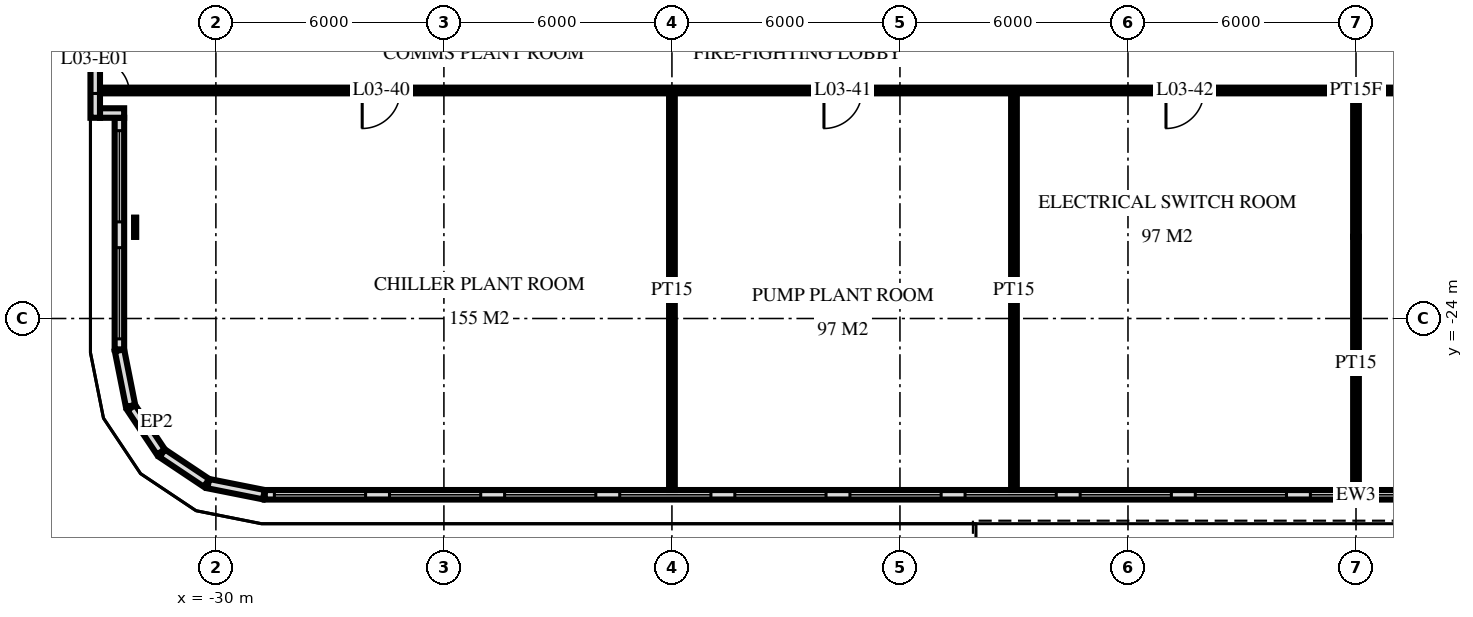
"""IFC4 building model, lengths in metres.
Left out: names, types, materials, properties, quantities, classifications, styles, units other than length and angle.
Written with IfcOpenShell. Run it as: python <this file> out.ifc"""

import sys

from ifc_helpers import new_model, si_unit, direction, frame, frame_2d, origin, place, context, subcontext, project, spatial, rectangle, extrude, element, fill, save


model = new_model("IFC4")
c1 = context("Model", 3, precision=1e-05, world=origin(), true_north=direction((0.0, 1.0)))
c2 = subcontext(c1, "Body", "Model", "MODEL_VIEW")
j1 = project(units=[si_unit("LENGTHUNIT", "METRE"), si_unit("PLANEANGLEUNIT", "RADIAN")], contexts=[c1])
p1 = place(None, origin())
s1 = spatial("IfcSite", under=j1, at=p1, CompositionType="ELEMENT")
p2 = place(p1, origin())
s2 = spatial("IfcBuilding", under=s1, at=p2, CompositionType="ELEMENT")
p3 = place(p2, frame((0.0, 0.0, 18.0)))
s3 = spatial("IfcBuildingStorey", under=s2, at=p3, CompositionType="ELEMENT", Elevation=18.0)
p4 = place(p3, frame((-33.175, -15.889, 0.0), z_axis=(0.0, 0.0, 1.0), x_axis=(0.0, -1.0, 0.0)))
e1 = element("IfcWall", 1, at=p4, inside=s3, PredefinedType="SOLIDWALL", context=c2, shape_type="SweptSolid", body=[
    extrude(rectangle(XDim=2.829, YDim=0.25, at=frame_2d((1.414, 0.0))), origin(), (0.0, 0.0, 1.0), 5.72),
])
p5 = place(p4, frame((0.389, 0.0, 0.0)))
e2 = element("IfcOpeningElement", 2, at=p5, cuts=e1, PredefinedType="OPENING", context=c2, shape_type="SweptSolid", body=[
    extrude(rectangle(XDim=1.8, YDim=2.4, at=frame_2d((0.9, 1.2))), frame((0.0, 0.135, 0.0), z_axis=(0.0, -1.0, 0.0), x_axis=(1.0, 0.0, 0.0)), (0.0, 0.0, 1.0), 0.27),
])
p6 = place(p3, frame((-33.05, -18.593, 0.0), z_axis=(0.0, 0.0, 1.0), x_axis=(1.0, 0.0, 0.0)))
e3 = element("IfcWall", 3, at=p6, inside=s3, PredefinedType="SOLIDWALL", context=c2, shape_type="SweptSolid", body=[
    extrude(rectangle(XDim=0.636, YDim=0.25, at=frame_2d((0.318, 0.0))), origin(), (0.0, 0.0, 1.0), 5.72),
])
p7 = place(p3, frame((-32.539, -18.718, 0.0), z_axis=(0.0, 0.0, 1.0), x_axis=(0.0, -1.0, 0.0)))
e4 = element("IfcWall", 4, at=p7, inside=s3, PredefinedType="SOLIDWALL", context=c2, shape_type="SweptSolid", body=[
    extrude(rectangle(XDim=6.095, YDim=0.25, at=frame_2d((3.047, 0.0))), origin(), (0.0, 0.0, 1.0), 5.72),
])
p8 = place(p7, frame((0.339, 0.0, 1.005)))
e5 = element("IfcOpeningElement", 5, at=p8, cuts=e4, PredefinedType="OPENING", context=c2, shape_type="SweptSolid", body=[
    extrude(rectangle(XDim=2.4, YDim=3.6, at=frame_2d((1.2, 1.8))), frame((0.0, 0.135, 0.0), z_axis=(0.0, -1.0, 0.0), x_axis=(1.0, 0.0, 0.0)), (0.0, 0.0, 1.0), 0.27),
])
p9 = place(p7, frame((3.418, 0.0, 1.005)))
e6 = element("IfcOpeningElement", 6, at=p9, cuts=e4, PredefinedType="OPENING", context=c2, shape_type="SweptSolid", body=[
    extrude(rectangle(XDim=2.4, YDim=3.6, at=frame_2d((1.2, 1.8))), frame((0.0, 0.135, 0.0), z_axis=(0.0, -1.0, 0.0), x_axis=(1.0, 0.0, 0.0)), (0.0, 0.0, 1.0), 0.27),
])
p10 = place(p3, frame((-32.537, -24.837, 0.0), z_axis=(0.0, 0.0, 1.0), x_axis=(0.195014837095, -0.980800292268, 0.0)))
e7 = element("IfcWall", 7, at=p10, inside=s3, PredefinedType="SOLIDWALL", context=c2, shape_type="SweptSolid", body=[
    extrude(rectangle(XDim=1.492, YDim=0.25, at=frame_2d((0.746, 0.0))), origin(), (0.0, 0.0, 1.0), 4.52),
])
for number, where, z_axis, x_axis in (
    (8, (-32.227, -26.346, 0.0), (0.0, 0.0, 1.0), (0.556, -0.831, 0.0)),
    (9, (-31.413, -27.547, 0.0), (0.0, 0.0, 1.0), (0.831, -0.556, 0.0)),
):
    element("IfcWall", number, at=place(p3, frame(where, z_axis=z_axis, x_axis=x_axis)), inside=s3, PredefinedType="SOLIDWALL", context=c2, shape_type="SweptSolid", body=[
        extrude(rectangle(XDim=1.403, YDim=0.25, at=frame_2d((0.702, 0.0))), origin(), (0.0, 0.0, 1.0), 5.72),
    ])
p11 = place(p3, frame((-30.201, -28.345, 0.0), z_axis=(0.0, 0.0, 1.0), x_axis=(0.980768988185, -0.19517221066, 0.0)))
e10 = element("IfcWall", 10, at=p11, inside=s3, PredefinedType="SOLIDWALL", context=c2, shape_type="SweptSolid", body=[
    extrude(rectangle(XDim=1.492, YDim=0.25, at=frame_2d((0.746, 0.0))), origin(), (0.0, 0.0, 1.0), 4.72),
])
p12 = place(p3, frame((-28.713, -28.639, 0.0), z_axis=(0.0, 0.0, 1.0), x_axis=(1.0, 0.0, 0.0)))
e11 = element("IfcWall", 11, at=p12, inside=s3, PredefinedType="SOLIDWALL", context=c2, shape_type="SweptSolid", body=[
    extrude(rectangle(XDim=57.426, YDim=0.25, at=frame_2d((28.713, 0.0))), origin(), (0.0, 0.0, 1.0), 5.72),
])
p13 = place(p12, frame((0.252, 0.0, 0.858)))
e12 = element("IfcOpeningElement", 12, at=p13, cuts=e11, PredefinedType="OPENING", context=c2, shape_type="SweptSolid", body=[
    extrude(rectangle(XDim=2.4, YDim=3.6, at=frame_2d((1.2, 1.8))), frame((0.0, 0.135, 0.0), z_axis=(0.0, -1.0, 0.0), x_axis=(1.0, 0.0, 0.0)), (0.0, 0.0, 1.0), 0.27),
])
p14 = place(p12, frame((3.281, 0.0, 0.858)))
e13 = element("IfcOpeningElement", 13, at=p14, cuts=e11, PredefinedType="OPENING", context=c2, shape_type="SweptSolid", body=[
    extrude(rectangle(XDim=2.4, YDim=3.6, at=frame_2d((1.2, 1.8))), frame((0.0, 0.135, 0.0), z_axis=(0.0, -1.0, 0.0), x_axis=(1.0, 0.0, 0.0)), (0.0, 0.0, 1.0), 0.27),
])
p15 = place(p12, frame((6.31, 0.0, 0.858)))
e14 = element("IfcOpeningElement", 14, at=p15, cuts=e11, PredefinedType="OPENING", context=c2, shape_type="SweptSolid", body=[
    extrude(rectangle(XDim=2.4, YDim=3.6, at=frame_2d((1.2, 1.8))), frame((0.0, 0.135, 0.0), z_axis=(0.0, -1.0, 0.0), x_axis=(1.0, 0.0, 0.0)), (0.0, 0.0, 1.0), 0.27),
])
p16 = place(p12, frame((9.339, 0.0, 0.858)))
e15 = element("IfcOpeningElement", 15, at=p16, cuts=e11, PredefinedType="OPENING", context=c2, shape_type="SweptSolid", body=[
    extrude(rectangle(XDim=2.4, YDim=3.6, at=frame_2d((1.2, 1.8))), frame((0.0, 0.135, 0.0), z_axis=(0.0, -1.0, 0.0), x_axis=(1.0, 0.0, 0.0)), (0.0, 0.0, 1.0), 0.27),
])
p17 = place(p12, frame((12.368, 0.0, 0.858)))
e16 = element("IfcOpeningElement", 16, at=p17, cuts=e11, PredefinedType="OPENING", context=c2, shape_type="SweptSolid", body=[
    extrude(rectangle(XDim=2.4, YDim=3.6, at=frame_2d((1.2, 1.8))), frame((0.0, 0.135, 0.0), z_axis=(0.0, -1.0, 0.0), x_axis=(1.0, 0.0, 0.0)), (0.0, 0.0, 1.0), 0.27),
])
p18 = place(p12, frame((15.397, 0.0, 0.858)))
e17 = element("IfcOpeningElement", 17, at=p18, cuts=e11, PredefinedType="OPENING", context=c2, shape_type="SweptSolid", body=[
    extrude(rectangle(XDim=2.4, YDim=3.6, at=frame_2d((1.2, 1.8))), frame((0.0, 0.135, 0.0), z_axis=(0.0, -1.0, 0.0), x_axis=(1.0, 0.0, 0.0)), (0.0, 0.0, 1.0), 0.27),
])
p19 = place(p12, frame((18.426, 0.0, 0.858)))
e18 = element("IfcOpeningElement", 18, at=p19, cuts=e11, PredefinedType="OPENING", context=c2, shape_type="SweptSolid", body=[
    extrude(rectangle(XDim=2.4, YDim=3.6, at=frame_2d((1.2, 1.8))), frame((0.0, 0.135, 0.0), z_axis=(0.0, -1.0, 0.0), x_axis=(1.0, 0.0, 0.0)), (0.0, 0.0, 1.0), 0.27),
])
p20 = place(p12, frame((21.455, 0.0, 0.858)))
e19 = element("IfcOpeningElement", 19, at=p20, cuts=e11, PredefinedType="OPENING", context=c2, shape_type="SweptSolid", body=[
    extrude(rectangle(XDim=2.4, YDim=3.6, at=frame_2d((1.2, 1.8))), frame((0.0, 0.135, 0.0), z_axis=(0.0, -1.0, 0.0), x_axis=(1.0, 0.0, 0.0)), (0.0, 0.0, 1.0), 0.27),
])
p21 = place(p12, frame((24.484, 0.0, 0.858)))
e20 = element("IfcOpeningElement", 20, at=p21, cuts=e11, PredefinedType="OPENING", context=c2, shape_type="SweptSolid", body=[
    extrude(rectangle(XDim=2.4, YDim=3.6, at=frame_2d((1.2, 1.8))), frame((0.0, 0.135, 0.0), z_axis=(0.0, -1.0, 0.0), x_axis=(1.0, 0.0, 0.0)), (0.0, 0.0, 1.0), 0.27),
])
p22 = place(p12, frame((27.513, 0.0, 0.858)))
e21 = element("IfcOpeningElement", 21, at=p22, cuts=e11, PredefinedType="OPENING", context=c2, shape_type="SweptSolid", body=[
    extrude(rectangle(XDim=2.4, YDim=3.6, at=frame_2d((1.2, 1.8))), frame((0.0, 0.135, 0.0), z_axis=(0.0, -1.0, 0.0), x_axis=(1.0, 0.0, 0.0)), (0.0, 0.0, 1.0), 0.27),
])
p23 = place(p12, frame((30.542, 0.0, 0.858)))
e22 = element("IfcOpeningElement", 22, at=p23, cuts=e11, PredefinedType="OPENING", context=c2, shape_type="SweptSolid", body=[
    extrude(rectangle(XDim=2.4, YDim=3.6, at=frame_2d((1.2, 1.8))), frame((0.0, 0.135, 0.0), z_axis=(0.0, -1.0, 0.0), x_axis=(1.0, 0.0, 0.0)), (0.0, 0.0, 1.0), 0.27),
])
p24 = place(p12, frame((33.571, 0.0, 0.858)))
e23 = element("IfcOpeningElement", 23, at=p24, cuts=e11, PredefinedType="OPENING", context=c2, shape_type="SweptSolid", body=[
    extrude(rectangle(XDim=2.4, YDim=3.6, at=frame_2d((1.2, 1.8))), frame((0.0, 0.135, 0.0), z_axis=(0.0, -1.0, 0.0), x_axis=(1.0, 0.0, 0.0)), (0.0, 0.0, 1.0), 0.27),
])
p25 = place(p12, frame((36.6, 0.0, 0.858)))
e24 = element("IfcOpeningElement", 24, at=p25, cuts=e11, PredefinedType="OPENING", context=c2, shape_type="SweptSolid", body=[
    extrude(rectangle(XDim=2.4, YDim=3.6, at=frame_2d((1.2, 1.8))), frame((0.0, 0.135, 0.0), z_axis=(0.0, -1.0, 0.0), x_axis=(1.0, 0.0, 0.0)), (0.0, 0.0, 1.0), 0.27),
])
p26 = place(p12, frame((39.629, 0.0, 0.858)))
e25 = element("IfcOpeningElement", 25, at=p26, cuts=e11, PredefinedType="OPENING", context=c2, shape_type="SweptSolid", body=[
    extrude(rectangle(XDim=2.4, YDim=3.6, at=frame_2d((1.2, 1.8))), frame((0.0, 0.135, 0.0), z_axis=(0.0, -1.0, 0.0), x_axis=(1.0, 0.0, 0.0)), (0.0, 0.0, 1.0), 0.27),
])
p27 = place(p12, frame((42.658, 0.0, 0.858)))
e26 = element("IfcOpeningElement", 26, at=p27, cuts=e11, PredefinedType="OPENING", context=c2, shape_type="SweptSolid", body=[
    extrude(rectangle(XDim=2.4, YDim=3.6, at=frame_2d((1.2, 1.8))), frame((0.0, 0.135, 0.0), z_axis=(0.0, -1.0, 0.0), x_axis=(1.0, 0.0, 0.0)), (0.0, 0.0, 1.0), 0.27),
])
p28 = place(p12, frame((45.687, 0.0, 0.858)))
e27 = element("IfcOpeningElement", 27, at=p28, cuts=e11, PredefinedType="OPENING", context=c2, shape_type="SweptSolid", body=[
    extrude(rectangle(XDim=2.4, YDim=3.6, at=frame_2d((1.2, 1.8))), frame((0.0, 0.135, 0.0), z_axis=(0.0, -1.0, 0.0), x_axis=(1.0, 0.0, 0.0)), (0.0, 0.0, 1.0), 0.27),
])
p29 = place(p12, frame((48.716, 0.0, 0.858)))
e28 = element("IfcOpeningElement", 28, at=p29, cuts=e11, PredefinedType="OPENING", context=c2, shape_type="SweptSolid", body=[
    extrude(rectangle(XDim=2.4, YDim=3.6, at=frame_2d((1.2, 1.8))), frame((0.0, 0.135, 0.0), z_axis=(0.0, -1.0, 0.0), x_axis=(1.0, 0.0, 0.0)), (0.0, 0.0, 1.0), 0.27),
])
p30 = place(p12, frame((51.745, 0.0, 0.858)))
e29 = element("IfcOpeningElement", 29, at=p30, cuts=e11, PredefinedType="OPENING", context=c2, shape_type="SweptSolid", body=[
    extrude(rectangle(XDim=2.4, YDim=3.6, at=frame_2d((1.2, 1.8))), frame((0.0, 0.135, 0.0), z_axis=(0.0, -1.0, 0.0), x_axis=(1.0, 0.0, 0.0)), (0.0, 0.0, 1.0), 0.27),
])
p31 = place(p12, frame((54.774, 0.0, 0.858)))
e30 = element("IfcOpeningElement", 30, at=p31, cuts=e11, PredefinedType="OPENING", context=c2, shape_type="SweptSolid", body=[
    extrude(rectangle(XDim=2.4, YDim=3.6, at=frame_2d((1.2, 1.8))), frame((0.0, 0.135, 0.0), z_axis=(0.0, -1.0, 0.0), x_axis=(1.0, 0.0, 0.0)), (0.0, 0.0, 1.0), 0.27),
])
p32 = place(p3, frame((0.0, -28.512, 0.0), z_axis=(0.0, 0.0, 1.0), x_axis=(0.0, 1.0, 0.0)))
e31 = element("IfcWall", 31, at=p32, inside=s3, PredefinedType="PARTITIONING", context=c2, shape_type="SweptSolid", body=[
    extrude(rectangle(XDim=6.662, YDim=0.15, at=frame_2d((3.331, 0.0))), origin(), (0.0, 0.0, 1.0), 4.52),
])
p33 = place(p3, frame((-9.0, -28.512, 0.0), z_axis=(0.0, 0.0, 1.0), x_axis=(0.0, 1.0, 0.0)))
e32 = element("IfcWall", 32, at=p33, inside=s3, PredefinedType="PARTITIONING", context=c2, shape_type="SweptSolid", body=[
    extrude(rectangle(XDim=10.512, YDim=0.15, at=frame_2d((5.256, 0.0))), origin(), (0.0, 0.0, 1.0), 5.55),
])
p34 = place(p3, frame((-18.0, -28.512, 0.0), z_axis=(0.0, 0.0, 1.0), x_axis=(0.0, 1.0, 0.0)))
e33 = element("IfcWall", 33, at=p34, inside=s3, PredefinedType="PARTITIONING", context=c2, shape_type="SweptSolid", body=[
    extrude(rectangle(XDim=10.512, YDim=0.15, at=frame_2d((5.256, 0.0))), origin(), (0.0, 0.0, 1.0), 4.52),
])
p35 = place(p3, frame((-33.12, -18.0, 0.0), z_axis=(0.0, 0.0, 1.0), x_axis=(1.0, 0.0, 0.0)))
e34 = element("IfcWall", 34, at=p35, inside=s3, PredefinedType="PARTITIONING", context=c2, shape_type="SweptSolid", body=[
    extrude(rectangle(XDim=66.24, YDim=0.15, at=frame_2d((33.12, 0.0))), origin(), (0.0, 0.0, 1.0), 5.55),
])
p36 = place(p35, frame((6.97, 0.0, 0.0)))
e35 = element("IfcOpeningElement", 35, at=p36, cuts=e34, PredefinedType="OPENING", context=c2, shape_type="SweptSolid", body=[
    extrude(rectangle(XDim=1.0, YDim=2.1, at=frame_2d((0.5, 1.05))), frame((0.0, 0.085, 0.0), z_axis=(0.0, -1.0, 0.0), x_axis=(1.0, 0.0, 0.0)), (0.0, 0.0, 1.0), 0.17),
])
p37 = place(p35, frame((19.12, 0.0, 0.0)))
e36 = element("IfcOpeningElement", 36, at=p37, cuts=e34, PredefinedType="OPENING", context=c2, shape_type="SweptSolid", body=[
    extrude(rectangle(XDim=1.0, YDim=2.1, at=frame_2d((0.5, 1.05))), frame((0.0, 0.085, 0.0), z_axis=(0.0, -1.0, 0.0), x_axis=(1.0, 0.0, 0.0)), (0.0, 0.0, 1.0), 0.17),
])
p38 = place(p35, frame((28.12, 0.0, 0.0)))
e37 = element("IfcOpeningElement", 37, at=p38, cuts=e34, PredefinedType="OPENING", context=c2, shape_type="SweptSolid", body=[
    extrude(rectangle(XDim=1.0, YDim=2.1, at=frame_2d((0.5, 1.05))), frame((0.0, 0.085, 0.0), z_axis=(0.0, -1.0, 0.0), x_axis=(1.0, 0.0, 0.0)), (0.0, 0.0, 1.0), 0.17),
])
p39 = place(p35, frame((38.62, 0.0, 0.0)))
e38 = element("IfcOpeningElement", 38, at=p39, cuts=e34, PredefinedType="OPENING", context=c2, shape_type="SweptSolid", body=[
    extrude(rectangle(XDim=1.0, YDim=2.1, at=frame_2d((0.5, 1.05))), frame((0.0, 0.085, 0.0), z_axis=(0.0, -1.0, 0.0), x_axis=(1.0, 0.0, 0.0)), (0.0, 0.0, 1.0), 0.17),
])
p40 = place(p35, frame((49.12, 0.0, 0.0)))
e39 = element("IfcOpeningElement", 39, at=p40, cuts=e34, PredefinedType="OPENING", context=c2, shape_type="SweptSolid", body=[
    extrude(rectangle(XDim=1.0, YDim=2.1, at=frame_2d((0.5, 1.05))), frame((0.0, 0.085, 0.0), z_axis=(0.0, -1.0, 0.0), x_axis=(1.0, 0.0, 0.0)), (0.0, 0.0, 1.0), 0.17),
])
p41 = place(p35, frame((59.77, 0.0, 0.0)))
e40 = element("IfcOpeningElement", 40, at=p41, cuts=e34, PredefinedType="OPENING", context=c2, shape_type="SweptSolid", body=[
    extrude(rectangle(XDim=1.0, YDim=2.1, at=frame_2d((0.5, 1.05))), frame((0.0, 0.085, 0.0), z_axis=(0.0, -1.0, 0.0), x_axis=(1.0, 0.0, 0.0)), (0.0, 0.0, 1.0), 0.17),
])
p42 = place(p3, frame((0.0, -21.85, 0.0), z_axis=(0.0, 0.0, 1.0), x_axis=(0.0, 1.0, 0.0)))
e41 = element("IfcWall", 41, at=p42, inside=s3, PredefinedType="PARTITIONING", context=c2, shape_type="SweptSolid", body=[
    extrude(rectangle(XDim=3.85, YDim=0.15, at=frame_2d((1.925, 0.0))), origin(), (0.0, 0.0, 1.0), 5.55),
])
p43 = place(p5, origin())
e42 = element("IfcDoor", 42, at=p43, inside=s3, OperationType="DOUBLE_DOOR_SINGLE_SWING", PredefinedType="DOOR", context=c2, shape_type="SweptSolid", body=[
    extrude(rectangle(XDim=1.8, YDim=2.4, at=frame_2d((0.9, 1.2))), frame((0.0, 0.025, 0.0), z_axis=(0.0, -1.0, 0.0), x_axis=(1.0, 0.0, 0.0)), (0.0, 0.0, 1.0), 0.05),
])
fill(e2, e42)
p44 = place(p8, origin())
e43 = element("IfcWindow", 43, at=p44, inside=s3, PartitioningType="SINGLE_PANEL", PredefinedType="USERDEFINED", context=c2, shape_type="SweptSolid", body=[
    extrude(rectangle(XDim=2.4, YDim=3.6, at=frame_2d((1.2, 1.8))), frame((0.0, 0.125, 0.0), z_axis=(0.0, -1.0, 0.0), x_axis=(1.0, 0.0, 0.0)), (0.0, 0.0, 1.0), 0.06),
])
fill(e5, e43)
p45 = place(p9, origin())
e44 = element("IfcWindow", 44, at=p45, inside=s3, PartitioningType="SINGLE_PANEL", PredefinedType="USERDEFINED", context=c2, shape_type="SweptSolid", body=[
    extrude(rectangle(XDim=2.4, YDim=3.6, at=frame_2d((1.2, 1.8))), frame((0.0, 0.125, 0.0), z_axis=(0.0, -1.0, 0.0), x_axis=(1.0, 0.0, 0.0)), (0.0, 0.0, 1.0), 0.06),
])
fill(e6, e44)
p46 = place(p13, origin())
e45 = element("IfcWindow", 45, at=p46, inside=s3, PartitioningType="SINGLE_PANEL", PredefinedType="USERDEFINED", context=c2, shape_type="SweptSolid", body=[
    extrude(rectangle(XDim=2.4, YDim=3.6, at=frame_2d((1.2, 1.8))), frame((0.0, 0.125, 0.0), z_axis=(0.0, -1.0, 0.0), x_axis=(1.0, 0.0, 0.0)), (0.0, 0.0, 1.0), 0.06),
])
fill(e12, e45)
p47 = place(p14, origin())
e46 = element("IfcWindow", 46, at=p47, inside=s3, PartitioningType="SINGLE_PANEL", PredefinedType="USERDEFINED", context=c2, shape_type="SweptSolid", body=[
    extrude(rectangle(XDim=2.4, YDim=3.6, at=frame_2d((1.2, 1.8))), frame((0.0, 0.125, 0.0), z_axis=(0.0, -1.0, 0.0), x_axis=(1.0, 0.0, 0.0)), (0.0, 0.0, 1.0), 0.06),
])
fill(e13, e46)
p48 = place(p15, origin())
e47 = element("IfcWindow", 47, at=p48, inside=s3, PartitioningType="SINGLE_PANEL", PredefinedType="USERDEFINED", context=c2, shape_type="SweptSolid", body=[
    extrude(rectangle(XDim=2.4, YDim=3.6, at=frame_2d((1.2, 1.8))), frame((0.0, 0.125, 0.0), z_axis=(0.0, -1.0, 0.0), x_axis=(1.0, 0.0, 0.0)), (0.0, 0.0, 1.0), 0.06),
])
fill(e14, e47)
p49 = place(p16, origin())
e48 = element("IfcWindow", 48, at=p49, inside=s3, PartitioningType="SINGLE_PANEL", PredefinedType="USERDEFINED", context=c2, shape_type="SweptSolid", body=[
    extrude(rectangle(XDim=2.4, YDim=3.6, at=frame_2d((1.2, 1.8))), frame((0.0, 0.125, 0.0), z_axis=(0.0, -1.0, 0.0), x_axis=(1.0, 0.0, 0.0)), (0.0, 0.0, 1.0), 0.06),
])
fill(e15, e48)
p50 = place(p17, origin())
e49 = element("IfcWindow", 49, at=p50, inside=s3, PartitioningType="SINGLE_PANEL", PredefinedType="USERDEFINED", context=c2, shape_type="SweptSolid", body=[
    extrude(rectangle(XDim=2.4, YDim=3.6, at=frame_2d((1.2, 1.8))), frame((0.0, 0.125, 0.0), z_axis=(0.0, -1.0, 0.0), x_axis=(1.0, 0.0, 0.0)), (0.0, 0.0, 1.0), 0.06),
])
fill(e16, e49)
p51 = place(p18, origin())
e50 = element("IfcWindow", 50, at=p51, inside=s3, PartitioningType="SINGLE_PANEL", PredefinedType="USERDEFINED", context=c2, shape_type="SweptSolid", body=[
    extrude(rectangle(XDim=2.4, YDim=3.6, at=frame_2d((1.2, 1.8))), frame((0.0, 0.125, 0.0), z_axis=(0.0, -1.0, 0.0), x_axis=(1.0, 0.0, 0.0)), (0.0, 0.0, 1.0), 0.06),
])
fill(e17, e50)
p52 = place(p19, origin())
e51 = element("IfcWindow", 51, at=p52, inside=s3, PartitioningType="SINGLE_PANEL", PredefinedType="USERDEFINED", context=c2, shape_type="SweptSolid", body=[
    extrude(rectangle(XDim=2.4, YDim=3.6, at=frame_2d((1.2, 1.8))), frame((0.0, 0.125, 0.0), z_axis=(0.0, -1.0, 0.0), x_axis=(1.0, 0.0, 0.0)), (0.0, 0.0, 1.0), 0.06),
])
fill(e18, e51)
p53 = place(p20, origin())
e52 = element("IfcWindow", 52, at=p53, inside=s3, PartitioningType="SINGLE_PANEL", PredefinedType="USERDEFINED", context=c2, shape_type="SweptSolid", body=[
    extrude(rectangle(XDim=2.4, YDim=3.6, at=frame_2d((1.2, 1.8))), frame((0.0, 0.125, 0.0), z_axis=(0.0, -1.0, 0.0), x_axis=(1.0, 0.0, 0.0)), (0.0, 0.0, 1.0), 0.06),
])
fill(e19, e52)
p54 = place(p21, origin())
e53 = element("IfcWindow", 53, at=p54, inside=s3, PartitioningType="SINGLE_PANEL", PredefinedType="USERDEFINED", context=c2, shape_type="SweptSolid", body=[
    extrude(rectangle(XDim=2.4, YDim=3.6, at=frame_2d((1.2, 1.8))), frame((0.0, 0.125, 0.0), z_axis=(0.0, -1.0, 0.0), x_axis=(1.0, 0.0, 0.0)), (0.0, 0.0, 1.0), 0.06),
])
fill(e20, e53)
p55 = place(p22, origin())
e54 = element("IfcWindow", 54, at=p55, inside=s3, PartitioningType="SINGLE_PANEL", PredefinedType="USERDEFINED", context=c2, shape_type="SweptSolid", body=[
    extrude(rectangle(XDim=2.4, YDim=3.6, at=frame_2d((1.2, 1.8))), frame((0.0, 0.125, 0.0), z_axis=(0.0, -1.0, 0.0), x_axis=(1.0, 0.0, 0.0)), (0.0, 0.0, 1.0), 0.06),
])
fill(e21, e54)
p56 = place(p36, frame((0.5, 0.0, 0.0), z_axis=(0.0, 0.0, 1.0), x_axis=(-1.0, 0.0, 0.0)))
e55 = element("IfcDoor", 55, at=p56, inside=s3, OperationType="SINGLE_SWING_LEFT", PredefinedType="DOOR", context=c2, shape_type="SweptSolid", body=[
    extrude(rectangle(XDim=1.0, YDim=2.1, at=frame_2d((0.0, 1.05))), frame((0.0, -0.025, 0.0), z_axis=(0.0, 1.0, 0.0), x_axis=(-1.0, 0.0, 0.0)), (0.0, 0.0, 1.0), 0.05),
])
fill(e35, e55)
p57 = place(p37, frame((0.5, 0.0, 0.0), z_axis=(0.0, 0.0, 1.0), x_axis=(-1.0, 0.0, 0.0)))
e56 = element("IfcDoor", 56, at=p57, inside=s3, OperationType="SINGLE_SWING_LEFT", PredefinedType="DOOR", context=c2, shape_type="SweptSolid", body=[
    extrude(rectangle(XDim=1.0, YDim=2.1, at=frame_2d((0.0, 1.05))), frame((0.0, -0.025, 0.0), z_axis=(0.0, 1.0, 0.0), x_axis=(-1.0, 0.0, 0.0)), (0.0, 0.0, 1.0), 0.05),
])
fill(e36, e56)
p58 = place(p38, frame((0.5, 0.0, 0.0), z_axis=(0.0, 0.0, 1.0), x_axis=(-1.0, 0.0, 0.0)))
e57 = element("IfcDoor", 57, at=p58, inside=s3, OperationType="SINGLE_SWING_LEFT", PredefinedType="DOOR", context=c2, shape_type="SweptSolid", body=[
    extrude(rectangle(XDim=1.0, YDim=2.1, at=frame_2d((0.0, 1.05))), frame((0.0, -0.025, 0.0), z_axis=(0.0, 1.0, 0.0), x_axis=(-1.0, 0.0, 0.0)), (0.0, 0.0, 1.0), 0.05),
])
fill(e37, e57)
save(model, sys.argv[1])
